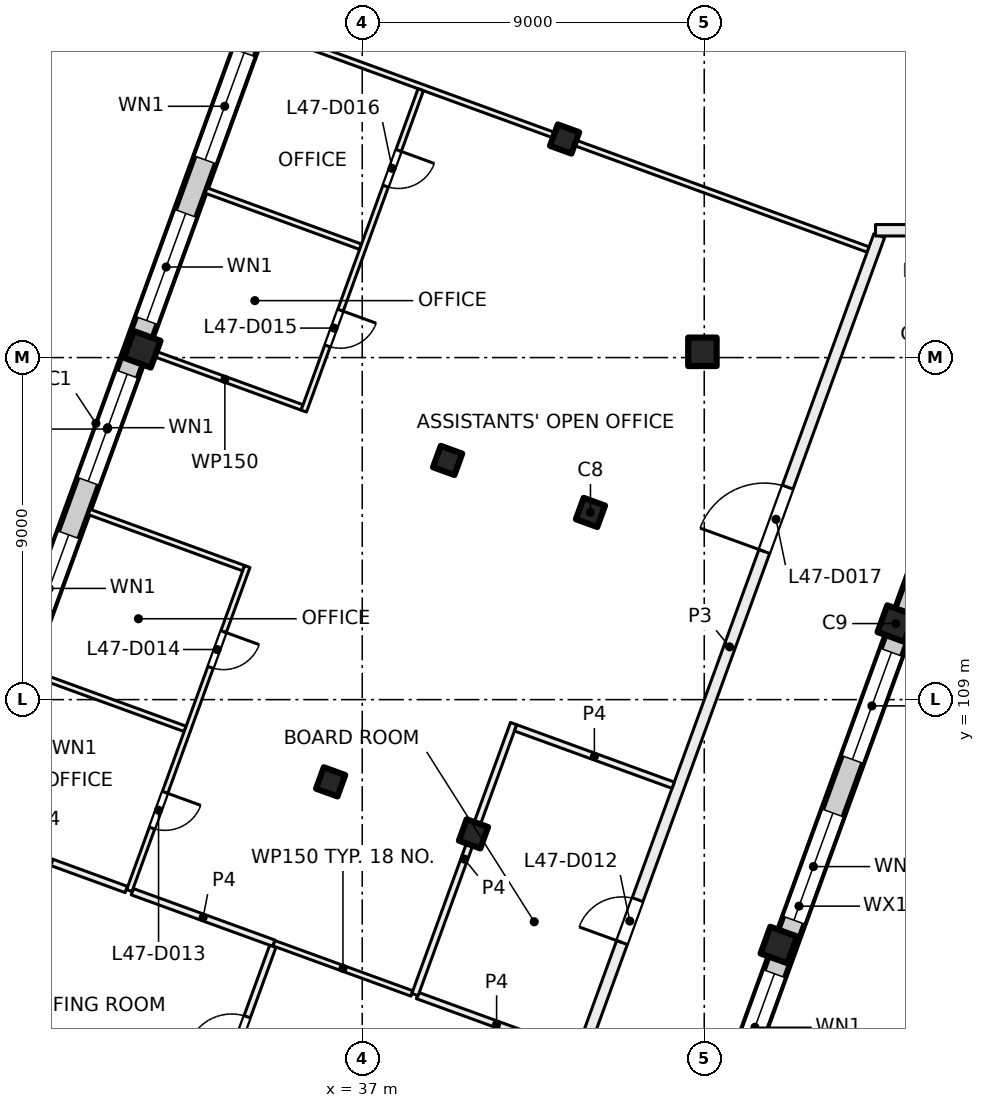
"""IFC4 building model, lengths in metres.
Left out: names, types, materials, properties, quantities, classifications, styles, units other than length and angle.
Written with IfcOpenShell. Run it as: python <this file> out.ifc"""

import sys

from ifc_helpers import new_model, si_unit, direction, frame, frame_2d, origin, origin_2d, place, context, subcontext, project, spatial, rectangle, extrude, element, fill, save


model = new_model("IFC4")
c1 = context("Model", 3, precision=1e-05, world=origin(), true_north=direction((0.0, 1.0)))
c2 = subcontext(c1, "Body", "Model", "MODEL_VIEW")
j1 = project(units=[si_unit("LENGTHUNIT", "METRE"), si_unit("PLANEANGLEUNIT", "RADIAN")], contexts=[c1])
p1 = place(None, origin())
s1 = spatial("IfcSite", under=j1, at=p1, CompositionType="ELEMENT")
p2 = place(p1, origin())
s2 = spatial("IfcBuilding", under=s1, at=p2, CompositionType="ELEMENT")
p3 = place(p2, frame((0.0, 0.0, 200.0)))
s3 = spatial("IfcBuildingStorey", under=s2, at=p3, CompositionType="ELEMENT", Elevation=200.0)
p4 = place(p3, frame((45.952, 118.152, 0.0), z_axis=(0.0, 0.0, 1.0), x_axis=(1.0, 0.0, 0.0)))
e1 = element("IfcColumn", 1, at=p4, inside=s3, PredefinedType="COLUMN", context=c2, shape_type="SweptSolid", body=[
    extrude(rectangle(XDim=0.75, YDim=0.75, at=origin_2d()), origin(), (0.0, 0.0, 1.0), 4.0),
])
for number, where, z_axis, x_axis in (
    (2, (43.006, 113.925, 0.0), (0.0, 0.0, 1.0), (-0.342, -0.94, 0.0)),
    (3, (39.927, 105.468, 0.0), (0.0, 0.0, 1.0), (-0.342, -0.94, 0.0)),
    (4, (42.325, 123.751, 0.0), (0.0, 0.0, 1.0), (-0.342, -0.94, 0.0)),
    (5, (39.247, 115.293, 0.0), (0.0, 0.0, 1.0), (-0.342, -0.94, 0.0)),
    (6, (36.169, 106.836, 0.0), (0.0, 0.0, 1.0), (-0.342, -0.94, 0.0)),
):
    element("IfcColumn", number, at=place(p3, frame(where, z_axis=z_axis, x_axis=x_axis)), inside=s3, PredefinedType="COLUMN", context=c2, shape_type="SweptSolid", body=[
        extrude(rectangle(XDim=0.6, YDim=0.6, at=origin_2d()), origin(), (0.0, 0.0, 1.0), 4.0),
    ])
for number, where, z_axis, x_axis in (
    (7, (51.04, 111.001, 0.0), (0.0, 0.0, 1.0), (-0.342, -0.94, 0.0)),
    (8, (47.962, 102.544, 0.0), (0.0, 0.0, 1.0), (-0.342, -0.94, 0.0)),
    (9, (31.212, 118.218, 0.0), (0.0, 0.0, 1.0), (-0.342, -0.94, 0.0)),
):
    element("IfcColumn", number, at=place(p3, frame(where, z_axis=z_axis, x_axis=x_axis)), inside=s3, PredefinedType="COLUMN", context=c2, shape_type="SweptSolid", body=[
        extrude(rectangle(XDim=0.75, YDim=0.75, at=origin_2d()), origin(), (0.0, 0.0, 1.0), 4.0),
    ])
p5 = place(p3, frame((32.971, 97.465, 0.0), z_axis=(0.0, 0.0, 1.0), x_axis=(-0.939695066972, 0.34201342241, 0.0)))
e10 = element("IfcWall", 10, at=p5, inside=s3, PredefinedType="SHEAR", context=c2, shape_type="SweptSolid", body=[
    extrude(rectangle(XDim=8.7, YDim=0.3, at=frame_2d((4.35, 0.0))), origin(), (0.0, 0.0, 1.0), 4.0),
])
p6 = place(p3, frame((52.212, 113.783, 0.0), z_axis=(0.0, 0.0, 1.0), x_axis=(-0.34202521188, -0.939690775968, 0.0)))
e11 = element("IfcWall", 11, at=p6, inside=s3, PredefinedType="SOLIDWALL", context=c2, shape_type="SweptSolid", body=[
    extrude(rectangle(XDim=21.745, YDim=0.6, at=frame_2d((10.873, 0.0))), origin(), (0.0, 0.0, 1.0), 3.625),
])
p7 = place(p6, frame((3.765, 0.0, 0.9)))
e12 = element("IfcOpeningElement", 12, at=p7, cuts=e11, PredefinedType="OPENING", context=c2, shape_type="SweptSolid", body=[
    extrude(rectangle(XDim=3.0, YDim=2.4, at=frame_2d((1.5, 1.2))), frame((0.0, 0.31, 0.0), z_axis=(0.0, -1.0, 0.0), x_axis=(1.0, 0.0, 0.0)), (0.0, 0.0, 1.0), 0.62),
])
p8 = place(p6, frame((8.265, 0.0, 0.9)))
e13 = element("IfcOpeningElement", 13, at=p8, cuts=e11, PredefinedType="OPENING", context=c2, shape_type="SweptSolid", body=[
    extrude(rectangle(XDim=3.0, YDim=2.4, at=frame_2d((1.5, 1.2))), frame((0.0, 0.31, 0.0), z_axis=(0.0, -1.0, 0.0), x_axis=(1.0, 0.0, 0.0)), (0.0, 0.0, 1.0), 0.62),
])
p9 = place(p6, frame((12.765, 0.0, 0.9)))
e14 = element("IfcOpeningElement", 14, at=p9, cuts=e11, PredefinedType="OPENING", context=c2, shape_type="SweptSolid", body=[
    extrude(rectangle(XDim=3.0, YDim=2.4, at=frame_2d((1.5, 1.2))), frame((0.0, 0.31, 0.0), z_axis=(0.0, -1.0, 0.0), x_axis=(1.0, 0.0, 0.0)), (0.0, 0.0, 1.0), 0.62),
])
p10 = place(p6, frame((17.265, 0.0, 0.9)))
e15 = element("IfcOpeningElement", 15, at=p10, cuts=e11, PredefinedType="OPENING", context=c2, shape_type="SweptSolid", body=[
    extrude(rectangle(XDim=3.0, YDim=2.4, at=frame_2d((1.5, 1.2))), frame((0.0, 0.31, 0.0), z_axis=(0.0, -1.0, 0.0), x_axis=(1.0, 0.0, 0.0)), (0.0, 0.0, 1.0), 0.62),
])
p11 = place(p3, frame((24.666, 100.669, 0.0), z_axis=(0.0, 0.0, 1.0), x_axis=(0.34201964167, 0.939692803373, 0.0)))
e16 = element("IfcWall", 16, at=p11, inside=s3, PredefinedType="SOLIDWALL", context=c2, shape_type="SweptSolid", body=[
    extrude(rectangle(XDim=32.884, YDim=0.6, at=frame_2d((16.442, 0.0))), origin(), (0.0, 0.0, 1.0), 3.625),
])
p12 = place(p11, frame((1.48, 0.0, 0.9)))
e17 = element("IfcOpeningElement", 17, at=p12, cuts=e16, PredefinedType="OPENING", context=c2, shape_type="SweptSolid", body=[
    extrude(rectangle(XDim=3.0, YDim=2.4, at=frame_2d((1.5, 1.2))), frame((0.0, 0.31, 0.0), z_axis=(0.0, -1.0, 0.0), x_axis=(1.0, 0.0, 0.0)), (0.0, 0.0, 1.0), 0.62),
])
p13 = place(p11, frame((5.98, 0.0, 0.9)))
e18 = element("IfcOpeningElement", 18, at=p13, cuts=e16, PredefinedType="OPENING", context=c2, shape_type="SweptSolid", body=[
    extrude(rectangle(XDim=3.0, YDim=2.4, at=frame_2d((1.5, 1.2))), frame((0.0, 0.31, 0.0), z_axis=(0.0, -1.0, 0.0), x_axis=(1.0, 0.0, 0.0)), (0.0, 0.0, 1.0), 0.62),
])
p14 = place(p11, frame((10.48, 0.0, 0.9)))
e19 = element("IfcOpeningElement", 19, at=p14, cuts=e16, PredefinedType="OPENING", context=c2, shape_type="SweptSolid", body=[
    extrude(rectangle(XDim=3.0, YDim=2.4, at=frame_2d((1.5, 1.2))), frame((0.0, 0.31, 0.0), z_axis=(0.0, -1.0, 0.0), x_axis=(1.0, 0.0, 0.0)), (0.0, 0.0, 1.0), 0.62),
])
p15 = place(p11, frame((14.98, 0.0, 0.9)))
e20 = element("IfcOpeningElement", 20, at=p15, cuts=e16, PredefinedType="OPENING", context=c2, shape_type="SweptSolid", body=[
    extrude(rectangle(XDim=3.0, YDim=2.4, at=frame_2d((1.5, 1.2))), frame((0.0, 0.31, 0.0), z_axis=(0.0, -1.0, 0.0), x_axis=(1.0, 0.0, 0.0)), (0.0, 0.0, 1.0), 0.62),
])
p16 = place(p11, frame((19.48, 0.0, 0.9)))
e21 = element("IfcOpeningElement", 21, at=p16, cuts=e16, PredefinedType="OPENING", context=c2, shape_type="SweptSolid", body=[
    extrude(rectangle(XDim=3.0, YDim=2.4, at=frame_2d((1.5, 1.2))), frame((0.0, 0.31, 0.0), z_axis=(0.0, -1.0, 0.0), x_axis=(1.0, 0.0, 0.0)), (0.0, 0.0, 1.0), 0.62),
])
p17 = place(p11, frame((23.98, 0.0, 0.9)))
e22 = element("IfcOpeningElement", 22, at=p17, cuts=e16, PredefinedType="OPENING", context=c2, shape_type="SweptSolid", body=[
    extrude(rectangle(XDim=3.0, YDim=2.4, at=frame_2d((1.5, 1.2))), frame((0.0, 0.31, 0.0), z_axis=(0.0, -1.0, 0.0), x_axis=(1.0, 0.0, 0.0)), (0.0, 0.0, 1.0), 0.62),
])
p18 = place(p11, frame((28.48, 0.0, 0.9)))
e23 = element("IfcOpeningElement", 23, at=p18, cuts=e16, PredefinedType="OPENING", context=c2, shape_type="SweptSolid", body=[
    extrude(rectangle(XDim=3.0, YDim=2.4, at=frame_2d((1.5, 1.2))), frame((0.0, 0.31, 0.0), z_axis=(0.0, -1.0, 0.0), x_axis=(1.0, 0.0, 0.0)), (0.0, 0.0, 1.0), 0.62),
])
p19 = place(p3, frame((26.736, 105.48, 0.0), z_axis=(0.0, 0.0, 1.0), x_axis=(0.939677739056, -0.342061027776, 0.0)))
e24 = element("IfcWall", 24, at=p19, inside=s3, PredefinedType="PARTITIONING", context=c2, shape_type="SweptSolid", body=[
    extrude(rectangle(XDim=4.315, YDim=0.175, at=frame_2d((2.158, 0.0))), origin(), (0.0, 0.0, 1.0), 3.625),
])
p20 = place(p3, frame((28.275, 109.709, 0.0), z_axis=(0.0, 0.0, 1.0), x_axis=(0.939737385516, -0.341897128188, 0.0)))
e25 = element("IfcWall", 25, at=p20, inside=s3, PredefinedType="PARTITIONING", context=c2, shape_type="SweptSolid", body=[
    extrude(rectangle(XDim=4.326, YDim=0.15, at=frame_2d((2.163, 0.0))), origin(), (0.0, 0.0, 1.0), 3.625),
])
p21 = place(p3, frame((29.814, 113.938, 0.0), z_axis=(0.0, 0.0, 1.0), x_axis=(0.93973078783, -0.341915262023, 0.0)))
e26 = element("IfcWall", 26, at=p21, inside=s3, PredefinedType="PARTITIONING", context=c2, shape_type="SweptSolid", body=[
    extrude(rectangle(XDim=4.326, YDim=0.15, at=frame_2d((2.163, 0.0))), origin(), (0.0, 0.0, 1.0), 3.625),
])
p22 = place(p3, frame((30.95, 103.946, 0.0), z_axis=(0.0, 0.0, 1.0), x_axis=(0.939739492658, -0.341891336449, 0.0)))
e27 = element("IfcWall", 27, at=p22, inside=s3, PredefinedType="PARTITIONING", context=c2, shape_type="SweptSolid", body=[
    extrude(rectangle(XDim=3.966, YDim=0.175, at=frame_2d((1.983, 0.0))), origin(), (0.0, 0.0, 1.0), 3.625),
])
p23 = place(p3, frame((32.892, 122.395, 0.0), z_axis=(0.0, 0.0, 1.0), x_axis=(0.93973078783, -0.341915262023, 0.0)))
e28 = element("IfcWall", 28, at=p23, inside=s3, PredefinedType="PARTITIONING", context=c2, shape_type="SweptSolid", body=[
    extrude(rectangle(XDim=4.326, YDim=0.15, at=frame_2d((2.163, 0.0))), origin(), (0.0, 0.0, 1.0), 3.625),
])
p24 = place(p3, frame((33.975, 112.503, 0.0), z_axis=(0.0, 0.0, 1.0), x_axis=(-0.342067078165, -0.939675536574, 0.0)))
e29 = element("IfcWall", 29, at=p24, inside=s3, PredefinedType="PARTITIONING", context=c2, shape_type="SweptSolid", body=[
    extrude(rectangle(XDim=9.074, YDim=0.15, at=frame_2d((4.537, 0.0))), origin(), (0.0, 0.0, 1.0), 3.625),
])
p25 = place(p24, frame((6.325, 0.0, 0.0)))
e30 = element("IfcOpeningElement", 30, at=p25, cuts=e29, PredefinedType="OPENING", context=c2, shape_type="SweptSolid", body=[
    extrude(rectangle(XDim=1.0, YDim=2.1, at=frame_2d((0.5, 1.05))), frame((0.0, 0.085, 0.0), z_axis=(0.0, -1.0, 0.0), x_axis=(1.0, 0.0, 0.0)), (0.0, 0.0, 1.0), 0.17),
])
p26 = place(p24, frame((1.825, 0.0, 0.0)))
e31 = element("IfcOpeningElement", 31, at=p26, cuts=e29, PredefinedType="OPENING", context=c2, shape_type="SweptSolid", body=[
    extrude(rectangle(XDim=1.0, YDim=2.1, at=frame_2d((0.5, 1.05))), frame((0.0, 0.085, 0.0), z_axis=(0.0, -1.0, 0.0), x_axis=(1.0, 0.0, 0.0)), (0.0, 0.0, 1.0), 0.17),
])
p27 = place(p3, frame((34.431, 126.624, 0.0), z_axis=(0.0, 0.0, 1.0), x_axis=(0.939678226331, -0.342059689177, 0.0)))
e32 = element("IfcWall", 32, at=p27, inside=s3, PredefinedType="PARTITIONING", context=c2, shape_type="SweptSolid", body=[
    extrude(rectangle(XDim=16.901, YDim=0.15, at=frame_2d((8.45, 0.0))), origin(), (0.0, 0.0, 1.0), 3.625),
])
p28 = place(p3, frame((32.881, 97.657, 0.0), z_axis=(0.0, 0.0, 1.0), x_axis=(0.342058204353, 0.939678766832, 0.0)))
e33 = element("IfcWall", 33, at=p28, inside=s3, PredefinedType="PARTITIONING", context=c2, shape_type="SweptSolid", body=[
    extrude(rectangle(XDim=5.163, YDim=0.175, at=frame_2d((2.581, 0.0))), origin(), (0.0, 0.0, 1.0), 3.625),
])
p29 = place(p28, frame((1.991, 0.0, 0.0)))
e34 = element("IfcOpeningElement", 34, at=p29, cuts=e33, PredefinedType="OPENING", context=c2, shape_type="SweptSolid", body=[
    extrude(rectangle(XDim=1.2, YDim=2.1, at=frame_2d((0.6, 1.05))), frame((0.0, 0.097, 0.0), z_axis=(0.0, -1.0, 0.0), x_axis=(1.0, 0.0, 0.0)), (0.0, 0.0, 1.0), 0.195),
])
p30 = place(p3, frame((34.677, 102.59, 0.0), z_axis=(0.0, 0.0, 1.0), x_axis=(0.939688259666, -0.342032125166, 0.0)))
e35 = element("IfcWall", 35, at=p30, inside=s3, PredefinedType="PARTITIONING", context=c2, shape_type="SweptSolid", body=[
    extrude(rectangle(XDim=3.865, YDim=0.15, at=frame_2d((1.933, 0.0))), origin(), (0.0, 0.0, 1.0), 3.625),
])
p31 = place(p3, frame((35.418, 116.688, 0.0), z_axis=(0.0, 0.0, 1.0), x_axis=(-0.939803311208, 0.341715870634, 0.0)))
e36 = element("IfcWall", 36, at=p31, inside=s3, PredefinedType="PARTITIONING", context=c2, shape_type="SweptSolid", body=[
    extrude(rectangle(XDim=4.325, YDim=0.15, at=frame_2d((2.163, 0.0))), origin(), (0.0, 0.0, 1.0), 3.625),
])
p32 = place(p3, frame((38.54, 125.049, 0.0), z_axis=(0.0, 0.0, 1.0), x_axis=(-0.3420218461, -0.939692001025, 0.0)))
e37 = element("IfcWall", 37, at=p32, inside=s3, PredefinedType="PARTITIONING", context=c2, shape_type="SweptSolid", body=[
    extrude(rectangle(XDim=9.0, YDim=0.15, at=frame_2d((4.5, 0.0))), origin(), (0.0, 0.0, 1.0), 3.625),
])
p33 = place(p32, frame((6.175, 0.0, 0.0)))
e38 = element("IfcOpeningElement", 38, at=p33, cuts=e37, PredefinedType="OPENING", context=c2, shape_type="SweptSolid", body=[
    extrude(rectangle(XDim=1.0, YDim=2.1, at=frame_2d((0.5, 1.05))), frame((0.0, 0.085, 0.0), z_axis=(0.0, -1.0, 0.0), x_axis=(1.0, 0.0, 0.0)), (0.0, 0.0, 1.0), 0.17),
])
p34 = place(p32, frame((1.703, 0.0, 0.0)))
e39 = element("IfcOpeningElement", 39, at=p34, cuts=e37, PredefinedType="OPENING", context=c2, shape_type="SweptSolid", body=[
    extrude(rectangle(XDim=1.0, YDim=2.1, at=frame_2d((0.5, 1.05))), frame((0.0, 0.085, 0.0), z_axis=(0.0, -1.0, 0.0), x_axis=(1.0, 0.0, 0.0)), (0.0, 0.0, 1.0), 0.17),
])
p35 = place(p3, frame((38.455, 101.214, 0.0), z_axis=(0.0, 0.0, 1.0), x_axis=(0.939738687483, -0.341893549585, 0.0)))
e40 = element("IfcWall", 40, at=p35, inside=s3, PredefinedType="PARTITIONING", context=c2, shape_type="SweptSolid", body=[
    extrude(rectangle(XDim=4.429, YDim=0.175, at=frame_2d((2.214, 0.0))), origin(), (0.0, 0.0, 1.0), 3.625),
])
p36 = place(p3, frame((40.983, 108.369, 0.0), z_axis=(0.0, 0.0, 1.0), x_axis=(-0.342009155387, -0.939696619996, 0.0)))
e41 = element("IfcWall", 41, at=p36, inside=s3, PredefinedType="PARTITIONING", context=c2, shape_type="SweptSolid", body=[
    extrude(rectangle(XDim=7.587, YDim=0.175, at=frame_2d((3.794, 0.0))), origin(), (0.0, 0.0, 1.0), 3.625),
])
p37 = place(p3, frame((42.728, 99.567, 0.0), z_axis=(0.0, 0.0, 1.0), x_axis=(0.342015412648, 0.939694342598, 0.0)))
e42 = element("IfcWall", 42, at=p37, inside=s3, PredefinedType="PARTITIONING", context=c2, shape_type="SweptSolid", body=[
    extrude(rectangle(XDim=23.031, YDim=0.3, at=frame_2d((11.516, 0.0))), origin(), (0.0, 0.0, 1.0), 3.625),
])
p38 = place(p37, frame((3.237, 0.0, 0.0)))
e43 = element("IfcOpeningElement", 43, at=p38, cuts=e42, PredefinedType="OPENING", context=c2, shape_type="SweptSolid", body=[
    extrude(rectangle(XDim=1.2, YDim=2.1, at=frame_2d((0.6, 1.05))), frame((0.0, 0.16, 0.0), z_axis=(0.0, -1.0, 0.0), x_axis=(1.0, 0.0, 0.0)), (0.0, 0.0, 1.0), 0.32),
])
p39 = place(p37, frame((14.187, 0.0, 0.0)))
e44 = element("IfcOpeningElement", 44, at=p39, cuts=e42, PredefinedType="OPENING", context=c2, shape_type="SweptSolid", body=[
    extrude(rectangle(XDim=1.8, YDim=2.1, at=frame_2d((0.9, 1.05))), frame((0.0, 0.16, 0.0), z_axis=(0.0, -1.0, 0.0), x_axis=(1.0, 0.0, 0.0)), (0.0, 0.0, 1.0), 0.32),
])
p40 = place(p3, frame((45.182, 106.748, 0.0), z_axis=(0.0, 0.0, 1.0), x_axis=(-0.939717482524, 0.341951828534, 0.0)))
e45 = element("IfcWall", 45, at=p40, inside=s3, PredefinedType="PARTITIONING", context=c2, shape_type="SweptSolid", body=[
    extrude(rectangle(XDim=4.413, YDim=0.175, at=frame_2d((2.207, 0.0))), origin(), (0.0, 0.0, 1.0), 3.625),
])
p41 = place(p3, frame((50.506, 121.35, 0.0), z_axis=(0.0, 0.0, 1.0), x_axis=(1.0, 0.0, 0.0)))
e46 = element("IfcWall", 46, at=p41, inside=s3, PredefinedType="PARTITIONING", context=c2, shape_type="SweptSolid", body=[
    extrude(rectangle(XDim=35.306, YDim=0.3, at=frame_2d((17.653, 0.0))), origin(), (0.0, 0.0, 1.0), 3.625),
])
p42 = place(p41, frame((30.244, 0.0, 0.0)))
e47 = element("IfcOpeningElement", 47, at=p42, cuts=e46, PredefinedType="OPENING", context=c2, shape_type="SweptSolid", body=[
    extrude(rectangle(XDim=1.0, YDim=2.1, at=frame_2d((0.5, 1.05))), frame((0.0, 0.16, 0.0), z_axis=(0.0, -1.0, 0.0), x_axis=(1.0, 0.0, 0.0)), (0.0, 0.0, 1.0), 0.32),
])
p43 = place(p41, frame((14.094, 0.0, 0.0)))
e48 = element("IfcOpeningElement", 48, at=p43, cuts=e46, PredefinedType="OPENING", context=c2, shape_type="SweptSolid", body=[
    extrude(rectangle(XDim=1.8, YDim=2.1, at=frame_2d((0.9, 1.05))), frame((0.0, 0.16, 0.0), z_axis=(0.0, -1.0, 0.0), x_axis=(1.0, 0.0, 0.0)), (0.0, 0.0, 1.0), 0.32),
])
p44 = place(p41, frame((1.047, 0.0, 0.0)))
e49 = element("IfcOpeningElement", 49, at=p44, cuts=e46, PredefinedType="OPENING", context=c2, shape_type="SweptSolid", body=[
    extrude(rectangle(XDim=1.8, YDim=2.1, at=frame_2d((0.9, 1.05))), frame((0.0, 0.16, 0.0), z_axis=(0.0, -1.0, 0.0), x_axis=(1.0, 0.0, 0.0)), (0.0, 0.0, 1.0), 0.32),
])
p45 = place(p7, origin())
e50 = element("IfcWindow", 50, at=p45, inside=s3, PartitioningType="SINGLE_PANEL", PredefinedType="WINDOW", context=c2, shape_type="SweptSolid", body=[
    extrude(rectangle(XDim=3.0, YDim=2.4, at=frame_2d((1.5, 1.2))), frame((0.0, 0.03, 0.0), z_axis=(0.0, -1.0, 0.0), x_axis=(1.0, 0.0, 0.0)), (0.0, 0.0, 1.0), 0.06),
])
fill(e12, e50)
p46 = place(p8, origin())
e51 = element("IfcWindow", 51, at=p46, inside=s3, PartitioningType="SINGLE_PANEL", PredefinedType="WINDOW", context=c2, shape_type="SweptSolid", body=[
    extrude(rectangle(XDim=3.0, YDim=2.4, at=frame_2d((1.5, 1.2))), frame((0.0, 0.03, 0.0), z_axis=(0.0, -1.0, 0.0), x_axis=(1.0, 0.0, 0.0)), (0.0, 0.0, 1.0), 0.06),
])
fill(e13, e51)
p47 = place(p9, origin())
e52 = element("IfcWindow", 52, at=p47, inside=s3, PartitioningType="SINGLE_PANEL", PredefinedType="WINDOW", context=c2, shape_type="SweptSolid", body=[
    extrude(rectangle(XDim=3.0, YDim=2.4, at=frame_2d((1.5, 1.2))), frame((0.0, 0.03, 0.0), z_axis=(0.0, -1.0, 0.0), x_axis=(1.0, 0.0, 0.0)), (0.0, 0.0, 1.0), 0.06),
])
fill(e14, e52)
p48 = place(p14, origin())
e53 = element("IfcWindow", 53, at=p48, inside=s3, PartitioningType="SINGLE_PANEL", PredefinedType="WINDOW", context=c2, shape_type="SweptSolid", body=[
    extrude(rectangle(XDim=3.0, YDim=2.4, at=frame_2d((1.5, 1.2))), frame((0.0, 0.03, 0.0), z_axis=(0.0, -1.0, 0.0), x_axis=(1.0, 0.0, 0.0)), (0.0, 0.0, 1.0), 0.06),
])
fill(e19, e53)
p49 = place(p15, origin())
e54 = element("IfcWindow", 54, at=p49, inside=s3, PartitioningType="SINGLE_PANEL", PredefinedType="WINDOW", context=c2, shape_type="SweptSolid", body=[
    extrude(rectangle(XDim=3.0, YDim=2.4, at=frame_2d((1.5, 1.2))), frame((0.0, 0.03, 0.0), z_axis=(0.0, -1.0, 0.0), x_axis=(1.0, 0.0, 0.0)), (0.0, 0.0, 1.0), 0.06),
])
fill(e20, e54)
p50 = place(p16, origin())
e55 = element("IfcWindow", 55, at=p50, inside=s3, PartitioningType="SINGLE_PANEL", PredefinedType="WINDOW", context=c2, shape_type="SweptSolid", body=[
    extrude(rectangle(XDim=3.0, YDim=2.4, at=frame_2d((1.5, 1.2))), frame((0.0, 0.03, 0.0), z_axis=(0.0, -1.0, 0.0), x_axis=(1.0, 0.0, 0.0)), (0.0, 0.0, 1.0), 0.06),
])
fill(e21, e55)
p51 = place(p17, origin())
e56 = element("IfcWindow", 56, at=p51, inside=s3, PartitioningType="SINGLE_PANEL", PredefinedType="WINDOW", context=c2, shape_type="SweptSolid", body=[
    extrude(rectangle(XDim=3.0, YDim=2.4, at=frame_2d((1.5, 1.2))), frame((0.0, 0.03, 0.0), z_axis=(0.0, -1.0, 0.0), x_axis=(1.0, 0.0, 0.0)), (0.0, 0.0, 1.0), 0.06),
])
fill(e22, e56)
p52 = place(p29, origin())
e57 = element("IfcDoor", 57, at=p52, inside=s3, OperationType="DOUBLE_DOOR_SINGLE_SWING", PredefinedType="DOOR", context=c2, shape_type="SweptSolid", body=[
    extrude(rectangle(XDim=1.2, YDim=2.1, at=frame_2d((0.6, 1.05))), frame((0.0, 0.025, 0.0), z_axis=(0.0, -1.0, 0.0), x_axis=(1.0, 0.0, 0.0)), (0.0, 0.0, 1.0), 0.05),
])
fill(e34, e57)
p53 = place(p38, origin())
e58 = element("IfcDoor", 58, at=p53, inside=s3, OperationType="DOUBLE_DOOR_SINGLE_SWING", PredefinedType="DOOR", context=c2, shape_type="SweptSolid", body=[
    extrude(rectangle(XDim=1.2, YDim=2.1, at=frame_2d((0.6, 1.05))), frame((0.0, 0.025, 0.0), z_axis=(0.0, -1.0, 0.0), x_axis=(1.0, 0.0, 0.0)), (0.0, 0.0, 1.0), 0.05),
])
fill(e43, e58)
p54 = place(p25, origin())
e59 = element("IfcDoor", 59, at=p54, inside=s3, OperationType="SINGLE_SWING_LEFT", PredefinedType="DOOR", context=c2, shape_type="SweptSolid", body=[
    extrude(rectangle(XDim=1.0, YDim=2.1, at=frame_2d((0.5, 1.05))), frame((0.0, 0.025, 0.0), z_axis=(0.0, -1.0, 0.0), x_axis=(1.0, 0.0, 0.0)), (0.0, 0.0, 1.0), 0.05),
])
fill(e30, e59)
p55 = place(p26, origin())
e60 = element("IfcDoor", 60, at=p55, inside=s3, OperationType="SINGLE_SWING_LEFT", PredefinedType="DOOR", context=c2, shape_type="SweptSolid", body=[
    extrude(rectangle(XDim=1.0, YDim=2.1, at=frame_2d((0.5, 1.05))), frame((0.0, 0.025, 0.0), z_axis=(0.0, -1.0, 0.0), x_axis=(1.0, 0.0, 0.0)), (0.0, 0.0, 1.0), 0.05),
])
fill(e31, e60)
p56 = place(p33, origin())
e61 = element("IfcDoor", 61, at=p56, inside=s3, OperationType="SINGLE_SWING_RIGHT", PredefinedType="DOOR", context=c2, shape_type="SweptSolid", body=[
    extrude(rectangle(XDim=1.0, YDim=2.1, at=frame_2d((0.5, 1.05))), frame((0.0, 0.025, 0.0), z_axis=(0.0, -1.0, 0.0), x_axis=(1.0, 0.0, 0.0)), (0.0, 0.0, 1.0), 0.05),
])
fill(e38, e61)
p57 = place(p34, origin())
e62 = element("IfcDoor", 62, at=p57, inside=s3, OperationType="SINGLE_SWING_LEFT", PredefinedType="DOOR", context=c2, shape_type="SweptSolid", body=[
    extrude(rectangle(XDim=1.0, YDim=2.1, at=frame_2d((0.5, 1.05))), frame((0.0, 0.025, 0.0), z_axis=(0.0, -1.0, 0.0), x_axis=(1.0, 0.0, 0.0)), (0.0, 0.0, 1.0), 0.05),
])
fill(e39, e62)
p58 = place(p39, origin())
e63 = element("IfcDoor", 63, at=p58, inside=s3, OperationType="DOUBLE_DOOR_SINGLE_SWING", PredefinedType="DOOR", context=c2, shape_type="SweptSolid", body=[
    extrude(rectangle(XDim=1.8, YDim=2.1, at=frame_2d((0.9, 1.05))), frame((0.0, 0.025, 0.0), z_axis=(0.0, -1.0, 0.0), x_axis=(1.0, 0.0, 0.0)), (0.0, 0.0, 1.0), 0.05),
])
fill(e44, e63)
save(model, sys.argv[1])
